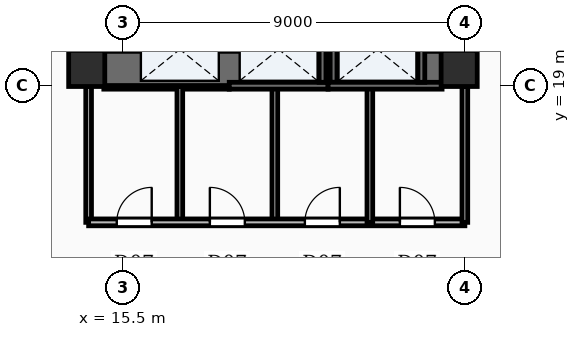
"""IFC4 building model, lengths in metres.
Left out: names, types, materials, properties, quantities, classifications, styles, units other than length and angle.
Written with IfcOpenShell. Run it as: python <this file> out.ifc"""

import sys

from ifc_helpers import new_model, si_unit, direction, frame, frame_2d, origin, origin_2d, place, context, subcontext, project, spatial, rectangle, extrude, element, fill, save


model = new_model("IFC4")
c1 = context("Model", 3, precision=1e-05, world=origin(), true_north=direction((0.0, 1.0)))
c2 = subcontext(c1, "Body", "Model", "MODEL_VIEW")
j1 = project(units=[si_unit("LENGTHUNIT", "METRE"), si_unit("PLANEANGLEUNIT", "RADIAN")], contexts=[c1])
p1 = place(None, origin())
s1 = spatial("IfcSite", under=j1, at=p1, CompositionType="ELEMENT")
p2 = place(p1, origin())
s2 = spatial("IfcBuilding", under=s1, at=p2, CompositionType="ELEMENT")
p3 = place(p2, origin())
s3 = spatial("IfcBuildingStorey", under=s2, at=p3, CompositionType="ELEMENT", Elevation=0.0)
p4 = place(p3, frame((14.55, 19.0, -0.45), z_axis=(0.0, 0.0, 1.0), x_axis=(0.0, 1.0, 0.0)))
e1 = element("IfcWall", 1, at=p4, inside=s3, PredefinedType="SHEAR", context=c2, shape_type="SweptSolid", body=[
    extrude(rectangle(XDim=15.3, YDim=0.9, at=frame_2d((7.65, 0.0))), origin(), (0.0, 0.0, 1.0), 8.1),
])
p5 = place(p3, frame((24.35, 19.0, -0.45), z_axis=(0.0, 0.0, 1.0), x_axis=(0.0, 1.0, 0.0)))
e2 = element("IfcWall", 2, at=p5, inside=s3, PredefinedType="SHEAR", context=c2, shape_type="SweptSolid", body=[
    extrude(rectangle(XDim=15.3, YDim=0.9, at=frame_2d((7.65, 0.0))), origin(), (0.0, 0.0, 1.0), 8.1),
])
p6 = place(p5, frame((2.5, 0.0, 0.45)))
e3 = element("IfcOpeningElement", 3, at=p6, cuts=e2, PredefinedType="OPENING", context=c2, shape_type="SweptSolid", body=[
    extrude(rectangle(XDim=1.05, YDim=2.15, at=frame_2d((0.525, 1.075))), frame((0.0, 0.46, 0.0), z_axis=(0.0, -1.0, 0.0), x_axis=(1.0, 0.0, 0.0)), (0.0, 0.0, 1.0), 0.92),
])
p7 = place(p5, frame((7.0, 0.0, 0.45)))
e4 = element("IfcOpeningElement", 4, at=p7, cuts=e2, PredefinedType="OPENING", context=c2, shape_type="SweptSolid", body=[
    extrude(rectangle(XDim=1.05, YDim=2.15, at=frame_2d((0.525, 1.075))), frame((0.0, 0.46, 0.0), z_axis=(0.0, -1.0, 0.0), x_axis=(1.0, 0.0, 0.0)), (0.0, 0.0, 1.0), 0.92),
])
p8 = place(p3, frame((15.0, 19.45, -0.45), z_axis=(0.0, 0.0, 1.0), x_axis=(1.0, 0.0, 0.0)))
e5 = element("IfcWall", 5, at=p8, inside=s3, PredefinedType="SHEAR", context=c2, shape_type="SweptSolid", body=[
    extrude(rectangle(XDim=8.9, YDim=0.9, at=frame_2d((4.45, 0.0))), origin(), (0.0, 0.0, 1.0), 8.1),
])
for number, where, z_axis, x_axis in (
    (6, (14.55, 19.45, -0.45), (0.0, 0.0, 1.0), (1.0, 0.0, 0.0)),
    (7, (24.35, 19.45, -0.45), (0.0, 0.0, 1.0), (1.0, 0.0, 0.0)),
):
    element("IfcColumn", number, at=place(p3, frame(where, z_axis=z_axis, x_axis=x_axis)), inside=s3, PredefinedType="COLUMN", context=c2, shape_type="SweptSolid", body=[
        extrude(rectangle(XDim=0.95, YDim=0.95, at=origin_2d()), origin(), (0.0, 0.0, 1.0), 8.1),
    ])
p9 = place(p3, frame((15.0, 18.995, 0.0), z_axis=(0.0, 0.0, 1.0), x_axis=(1.0, 0.0, 0.0)))
e8 = element("IfcWall", 8, at=p9, inside=s3, PredefinedType="SOLIDWALL", context=c2, shape_type="SweptSolid", body=[
    extrude(rectangle(XDim=3.3, YDim=0.18, at=frame_2d((1.65, 0.0))), origin(), (0.0, 0.0, 1.0), 7.65),
])
for number, where, z_axis, x_axis in (
    (9, (15.845, 19.085, 0.0), (0.0, 0.0, 1.0), (0.0, 1.0, 0.0)),
    (10, (18.155, 19.085, 0.0), (0.0, 0.0, 1.0), (0.0, 1.0, 0.0)),
):
    element("IfcWall", number, at=place(p3, frame(where, z_axis=z_axis, x_axis=x_axis)), inside=s3, PredefinedType="SOLIDWALL", context=c2, shape_type="SweptSolid", body=[
        extrude(rectangle(XDim=1.73, YDim=0.18, at=frame_2d((0.865, 0.0))), origin(), (0.0, 0.0, 1.0), 7.65),
    ])
p10 = place(p3, frame((18.3, 18.995, 0.0), z_axis=(0.0, 0.0, 1.0), x_axis=(1.0, 0.0, 0.0)))
e11 = element("IfcWall", 11, at=p10, inside=s3, PredefinedType="SOLIDWALL", context=c2, shape_type="SweptSolid", body=[
    extrude(rectangle(XDim=2.6, YDim=0.18, at=frame_2d((1.3, 0.0))), origin(), (0.0, 0.0, 1.0), 7.65),
])
for number, where, z_axis, x_axis in (
    (12, (18.445, 19.085, 0.0), (0.0, 0.0, 1.0), (0.0, 1.0, 0.0)),
    (13, (20.755, 19.085, 0.0), (0.0, 0.0, 1.0), (0.0, 1.0, 0.0)),
):
    element("IfcWall", number, at=place(p3, frame(where, z_axis=z_axis, x_axis=x_axis)), inside=s3, PredefinedType="SOLIDWALL", context=c2, shape_type="SweptSolid", body=[
        extrude(rectangle(XDim=1.73, YDim=0.18, at=frame_2d((0.865, 0.0))), origin(), (0.0, 0.0, 1.0), 7.65),
    ])
p11 = place(p3, frame((20.9, 18.995, 0.0), z_axis=(0.0, 0.0, 1.0), x_axis=(1.0, 0.0, 0.0)))
e14 = element("IfcWall", 14, at=p11, inside=s3, PredefinedType="SOLIDWALL", context=c2, shape_type="SweptSolid", body=[
    extrude(rectangle(XDim=3.0, YDim=0.18, at=frame_2d((1.5, 0.0))), origin(), (0.0, 0.0, 1.0), 7.65),
])
for number, where, z_axis, x_axis in (
    (15, (21.045, 19.085, 0.0), (0.0, 0.0, 1.0), (0.0, 1.0, 0.0)),
    (16, (23.355, 19.085, 0.0), (0.0, 0.0, 1.0), (0.0, 1.0, 0.0)),
):
    element("IfcWall", number, at=place(p3, frame(where, z_axis=z_axis, x_axis=x_axis)), inside=s3, PredefinedType="SOLIDWALL", context=c2, shape_type="SweptSolid", body=[
        extrude(rectangle(XDim=1.73, YDim=0.18, at=frame_2d((0.865, 0.0))), origin(), (0.0, 0.0, 1.0), 7.65),
    ])
for number, where, z_axis, x_axis in (
    (17, (17.0, 15.4, 0.0), (0.0, 0.0, 1.0), (0.0, 1.0, 0.0)),
    (18, (19.5, 15.4, 0.0), (0.0, 0.0, 1.0), (0.0, 1.0, 0.0)),
    (19, (22.0, 15.4, 0.0), (0.0, 0.0, 1.0), (0.0, 1.0, 0.0)),
):
    element("IfcWall", number, at=place(p3, frame(where, z_axis=z_axis, x_axis=x_axis)), inside=s3, PredefinedType="PARTITIONING", context=c2, shape_type="SweptSolid", body=[
        extrude(rectangle(XDim=3.58, YDim=0.15, at=frame_2d((1.79, 0.0))), origin(), (0.0, 0.0, 1.0), 6.71),
    ])
p12 = place(p3, frame((14.6, 15.4, 0.0), z_axis=(0.0, 0.0, 1.0), x_axis=(1.0, 0.0, 0.0)))
e20 = element("IfcWall", 20, at=p12, inside=s3, PredefinedType="PARTITIONING", context=c2, shape_type="SweptSolid", body=[
    extrude(rectangle(XDim=9.9, YDim=0.18, at=frame_2d((4.95, 0.0))), origin(), (0.0, 0.0, 1.0), 6.71),
])
p13 = place(p12, frame((0.74, 0.0, 0.0)))
e21 = element("IfcOpeningElement", 21, at=p13, cuts=e20, PredefinedType="OPENING", context=c2, shape_type="SweptSolid", body=[
    extrude(rectangle(XDim=0.92, YDim=2.1, at=frame_2d((0.46, 1.05))), frame((0.0, 0.1, 0.0), z_axis=(0.0, -1.0, 0.0), x_axis=(1.0, 0.0, 0.0)), (0.0, 0.0, 1.0), 0.2),
])
p14 = place(p12, frame((3.19, 0.0, 0.0)))
e22 = element("IfcOpeningElement", 22, at=p14, cuts=e20, PredefinedType="OPENING", context=c2, shape_type="SweptSolid", body=[
    extrude(rectangle(XDim=0.92, YDim=2.1, at=frame_2d((0.46, 1.05))), frame((0.0, 0.1, 0.0), z_axis=(0.0, -1.0, 0.0), x_axis=(1.0, 0.0, 0.0)), (0.0, 0.0, 1.0), 0.2),
])
p15 = place(p12, frame((5.69, 0.0, 0.0)))
e23 = element("IfcOpeningElement", 23, at=p15, cuts=e20, PredefinedType="OPENING", context=c2, shape_type="SweptSolid", body=[
    extrude(rectangle(XDim=0.92, YDim=2.1, at=frame_2d((0.46, 1.05))), frame((0.0, 0.1, 0.0), z_axis=(0.0, -1.0, 0.0), x_axis=(1.0, 0.0, 0.0)), (0.0, 0.0, 1.0), 0.2),
])
p16 = place(p12, frame((8.19, 0.0, 0.0)))
e24 = element("IfcOpeningElement", 24, at=p16, cuts=e20, PredefinedType="OPENING", context=c2, shape_type="SweptSolid", body=[
    extrude(rectangle(XDim=0.92, YDim=2.1, at=frame_2d((0.46, 1.05))), frame((0.0, 0.1, 0.0), z_axis=(0.0, -1.0, 0.0), x_axis=(1.0, 0.0, 0.0)), (0.0, 0.0, 1.0), 0.2),
])
for number, where, z_axis, x_axis in (
    (25, (14.6, 15.4, 0.0), (0.0, 0.0, 1.0), (0.0, 1.0, 0.0)),
    (26, (24.5, 15.4, 0.0), (0.0, 0.0, 1.0), (0.0, 1.0, 0.0)),
):
    element("IfcWall", number, at=place(p3, frame(where, z_axis=z_axis, x_axis=x_axis)), inside=s3, PredefinedType="PARTITIONING", context=c2, shape_type="SweptSolid", body=[
        extrude(rectangle(XDim=3.58, YDim=0.15, at=frame_2d((1.79, 0.0))), origin(), (0.0, 0.0, 1.0), 6.71),
    ])
p17 = place(p13, origin())
e27 = element("IfcDoor", 27, at=p17, inside=s3, OperationType="SINGLE_SWING_RIGHT", PredefinedType="DOOR", context=c2, shape_type="SweptSolid", body=[
    extrude(rectangle(XDim=0.92, YDim=2.1, at=frame_2d((0.46, 1.05))), frame((0.0, 0.025, 0.0), z_axis=(0.0, -1.0, 0.0), x_axis=(1.0, 0.0, 0.0)), (0.0, 0.0, 1.0), 0.05),
])
fill(e21, e27)
p18 = place(p14, origin())
e28 = element("IfcDoor", 28, at=p18, inside=s3, OperationType="SINGLE_SWING_LEFT", PredefinedType="DOOR", context=c2, shape_type="SweptSolid", body=[
    extrude(rectangle(XDim=0.92, YDim=2.1, at=frame_2d((0.46, 1.05))), frame((0.0, 0.025, 0.0), z_axis=(0.0, -1.0, 0.0), x_axis=(1.0, 0.0, 0.0)), (0.0, 0.0, 1.0), 0.05),
])
fill(e22, e28)
p19 = place(p15, origin())
e29 = element("IfcDoor", 29, at=p19, inside=s3, OperationType="SINGLE_SWING_RIGHT", PredefinedType="DOOR", context=c2, shape_type="SweptSolid", body=[
    extrude(rectangle(XDim=0.92, YDim=2.1, at=frame_2d((0.46, 1.05))), frame((0.0, 0.025, 0.0), z_axis=(0.0, -1.0, 0.0), x_axis=(1.0, 0.0, 0.0)), (0.0, 0.0, 1.0), 0.05),
])
fill(e23, e29)
p20 = place(p16, origin())
e30 = element("IfcDoor", 30, at=p20, inside=s3, OperationType="SINGLE_SWING_LEFT", PredefinedType="DOOR", context=c2, shape_type="SweptSolid", body=[
    extrude(rectangle(XDim=0.92, YDim=2.1, at=frame_2d((0.46, 1.05))), frame((0.0, 0.025, 0.0), z_axis=(0.0, -1.0, 0.0), x_axis=(1.0, 0.0, 0.0)), (0.0, 0.0, 1.0), 0.05),
])
fill(e24, e30)
save(model, sys.argv[1])
